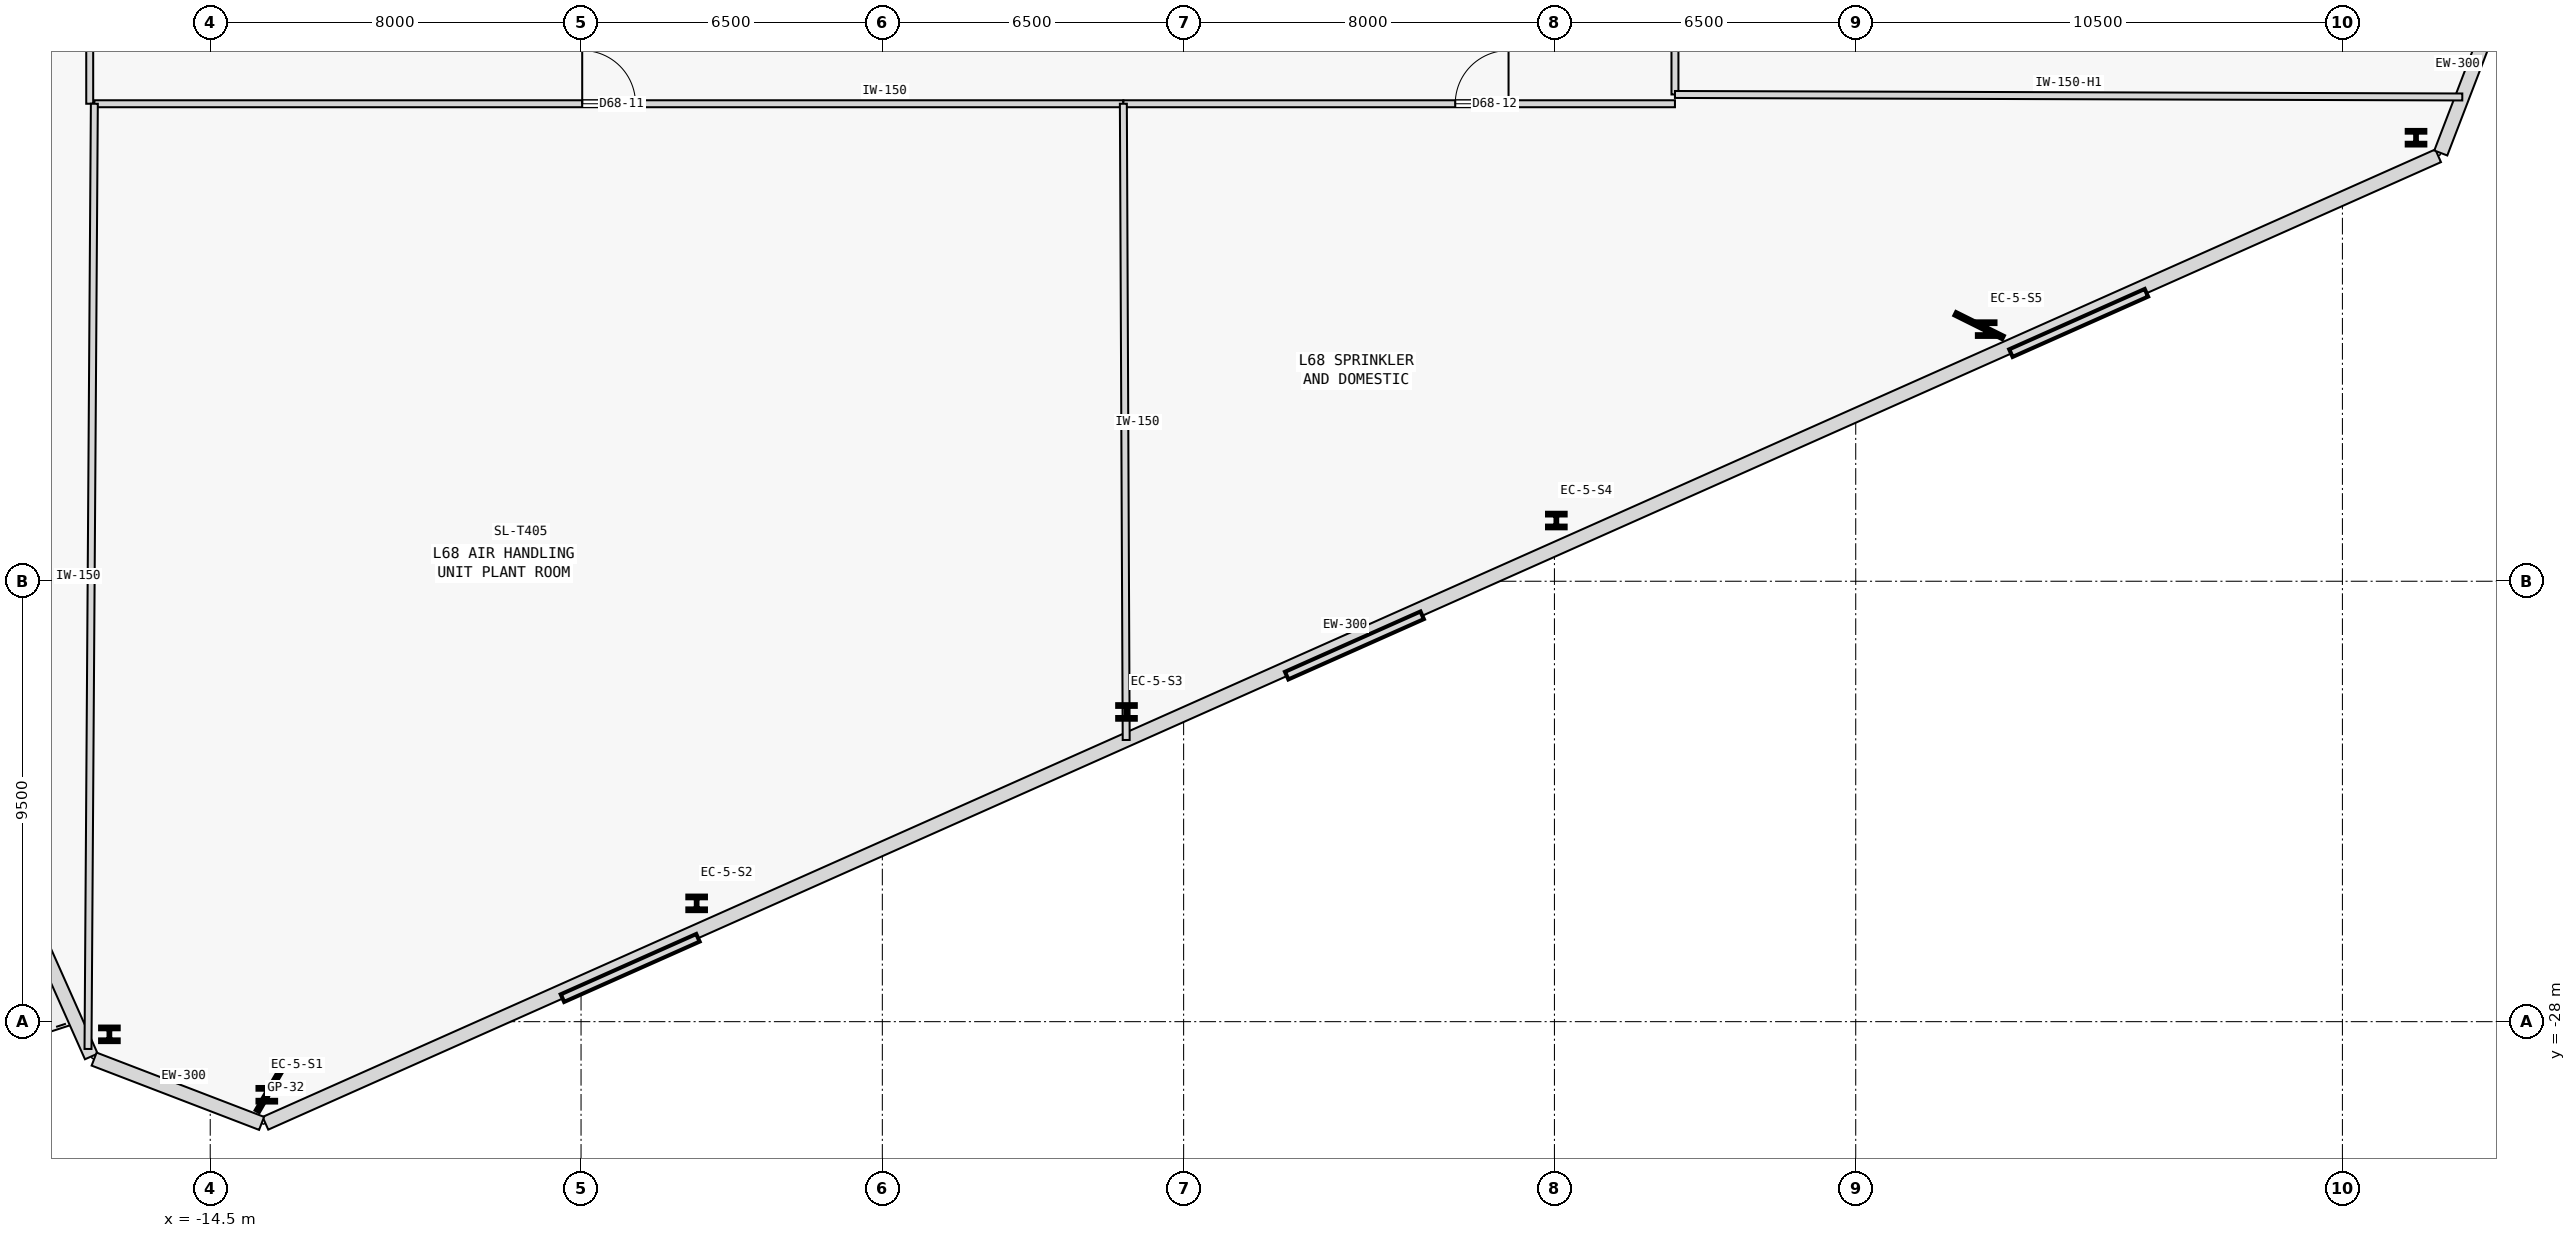
"""IFC4 building model, lengths in metres.
Left out: names, types, materials, properties, quantities, classifications, styles, units other than length and angle.
Written with IfcOpenShell. Run it as: python <this file> out.ifc"""

import sys

from ifc_helpers import new_model, si_unit, direction, frame, frame_2d, origin, origin_2d, place, context, subcontext, project, spatial, rectangle, i_section, extrude, element, fill, save


model = new_model("IFC4")
c1 = context("Model", 3, precision=1e-05, world=origin(), true_north=direction((0.0, 1.0)))
c2 = subcontext(c1, "Body", "Model", "MODEL_VIEW")
j1 = project(units=[si_unit("LENGTHUNIT", "METRE"), si_unit("PLANEANGLEUNIT", "RADIAN")], contexts=[c1])
p1 = place(None, origin())
s1 = spatial("IfcSite", under=j1, at=p1, CompositionType="ELEMENT")
p2 = place(p1, origin())
s2 = spatial("IfcBuilding", under=s1, at=p2, CompositionType="ELEMENT")
p3 = place(p2, frame((0.0, 0.0, 254.45)))
s3 = spatial("IfcBuildingStorey", under=s2, at=p3, CompositionType="ELEMENT", Elevation=254.45)
for number, where, z_axis, x_axis in (
    (1, (-13.28, -29.577, 0.0), (0.0, 0.0, 1.0), (1.0, 0.0, 0.0)),
    (2, (-4.006, -25.448, 0.0), (0.0, 0.0, 1.0), (1.0, 0.0, 0.0)),
    (3, (5.268, -21.319, 0.0), (0.0, 0.0, 1.0), (1.0, 0.0, 0.0)),
    (4, (14.541, -17.19, 0.0), (0.0, 0.0, 1.0), (1.0, 0.0, 0.0)),
    (5, (23.814, -13.062, 0.0), (0.0, 0.0, 1.0), (1.0, 0.0, 0.0)),
    (6, (33.088, -8.933, 0.0), (0.0, 0.0, 1.0), (1.0, 0.0, 0.0)),
    (7, (-16.676, -28.273, 0.0), (0.0, 0.0, 1.0), (1.0, 0.0, 0.0)),
):
    element("IfcColumn", number, at=place(p3, frame(where, z_axis=z_axis, x_axis=x_axis)), inside=s3, PredefinedType="COLUMN", context=c2, shape_type="SweptSolid", body=[
        extrude(i_section(OverallWidth=0.401, OverallDepth=0.335, WebThickness=0.036, FlangeThickness=0.058, FilletRadius=0.015, at=origin_2d()), origin(), (0.0, 0.0, 1.0), 4.4),
    ])
p4 = place(p3, frame((-13.309, -30.192, 0.0), z_axis=(0.0, 0.0, 1.0), x_axis=(0.913545681585, 0.406736140093, 0.0)))
e8 = element("IfcWall", 8, at=p4, inside=s3, PredefinedType="STANDARD", context=c2, shape_type="SweptSolid", body=[
    extrude(rectangle(XDim=51.31, YDim=0.3, at=frame_2d((25.655, 0.0))), origin(), (0.0, 0.0, 1.0), 4.175),
])
p5 = place(p3, frame((33.622, -9.262, 0.0), z_axis=(0.0, 0.0, 1.0), x_axis=(0.358344855618, 0.933589291098, 0.0)))
e9 = element("IfcWall", 9, at=p5, inside=s3, PredefinedType="STANDARD", context=c2, shape_type="SweptSolid", body=[
    extrude(rectangle(XDim=3.87, YDim=0.3, at=frame_2d((1.935, 0.0))), origin(), (0.0, 0.0, 1.0), 4.175),
])
p6 = place(p3, frame((-30.207, 0.766, 0.0), z_axis=(0.0, 0.0, 1.0), x_axis=(0.406735709426, -0.91354587333, 0.0)))
e10 = element("IfcWall", 10, at=p6, inside=s3, PredefinedType="STANDARD", context=c2, shape_type="SweptSolid", body=[
    extrude(rectangle(XDim=32.31, YDim=0.3, at=frame_2d((16.155, 0.0))), origin(), (0.0, 0.0, 1.0), 4.175),
])
p7 = place(p3, frame((-17.005, -28.808, 0.0), z_axis=(0.0, 0.0, 1.0), x_axis=(0.933589291098, -0.358344855618, 0.0)))
e11 = element("IfcWall", 11, at=p7, inside=s3, PredefinedType="STANDARD", context=c2, shape_type="SweptSolid", body=[
    extrude(rectangle(XDim=3.87, YDim=0.3, at=frame_2d((1.935, 0.0))), origin(), (0.0, 0.0, 1.0), 4.175),
])
p8 = place(p3, frame((-17.0, -8.2, 0.0), z_axis=(0.0, 0.0, 1.0), x_axis=(1.0, 0.0, 0.0)))
e12 = element("IfcWall", 12, at=p8, inside=s3, PredefinedType="PARTITIONING", context=c2, shape_type="SweptSolid", body=[
    extrude(rectangle(XDim=22.2, YDim=0.15, at=frame_2d((11.1, 0.0))), origin(), (0.0, 0.0, 1.0), 4.175),
])
p9 = place(p8, frame((10.525, 0.0, 0.0)))
e13 = element("IfcOpeningElement", 13, at=p9, cuts=e12, PredefinedType="OPENING", context=c2, shape_type="SweptSolid", body=[
    extrude(rectangle(XDim=1.15, YDim=2.15, at=frame_2d((0.575, 1.075))), frame((0.0, 0.085, 0.0), z_axis=(0.0, -1.0, 0.0), x_axis=(1.0, 0.0, 0.0)), (0.0, 0.0, 1.0), 0.17),
])
p10 = place(p3, frame((5.2, -8.2, 0.0), z_axis=(0.0, 0.0, 1.0), x_axis=(1.0, 0.0, 0.0)))
e14 = element("IfcWall", 14, at=p10, inside=s3, PredefinedType="PARTITIONING", context=c2, shape_type="SweptSolid", body=[
    extrude(rectangle(XDim=11.9, YDim=0.15, at=frame_2d((5.95, 0.0))), origin(), (0.0, 0.0, 1.0), 4.175),
])
p11 = place(p10, frame((7.16, 0.0, 0.0)))
e15 = element("IfcOpeningElement", 15, at=p11, cuts=e14, PredefinedType="OPENING", context=c2, shape_type="SweptSolid", body=[
    extrude(rectangle(XDim=1.15, YDim=2.15, at=frame_2d((0.575, 1.075))), frame((0.0, 0.085, 0.0), z_axis=(0.0, -1.0, 0.0), x_axis=(1.0, 0.0, 0.0)), (0.0, 0.0, 1.0), 0.17),
])
p12 = place(p3, frame((-17.1, -8.2, 0.0), z_axis=(0.0, 0.0, 1.0), x_axis=(0.0, 1.0, 0.0)))
e16 = element("IfcWall", 16, at=p12, inside=s3, PredefinedType="PARTITIONING", context=c2, shape_type="SweptSolid", body=[
    extrude(rectangle(XDim=16.4, YDim=0.15, at=frame_2d((8.2, 0.0))), origin(), (0.0, 0.0, 1.0), 4.175),
])
p13 = place(p12, frame((5.165, 0.0, 0.0)))
e17 = element("IfcOpeningElement", 17, at=p13, cuts=e16, PredefinedType="OPENING", context=c2, shape_type="SweptSolid", body=[
    extrude(rectangle(XDim=1.15, YDim=2.15, at=frame_2d((0.575, 1.075))), frame((0.0, 0.085, 0.0), z_axis=(0.0, -1.0, 0.0), x_axis=(1.0, 0.0, 0.0)), (0.0, 0.0, 1.0), 0.17),
])
p14 = place(p3, frame((17.1, -8.0, 0.0), z_axis=(0.0, 0.0, 1.0), x_axis=(0.0, 1.0, 0.0)))
e18 = element("IfcWall", 18, at=p14, inside=s3, PredefinedType="PARTITIONING", context=c2, shape_type="SweptSolid", body=[
    extrude(rectangle(XDim=16.0, YDim=0.15, at=frame_2d((8.0, 0.0))), origin(), (0.0, 0.0, 1.0), 4.175),
])
p15 = place(p14, frame((5.025, 0.0, 0.0)))
e19 = element("IfcOpeningElement", 19, at=p15, cuts=e18, PredefinedType="OPENING", context=c2, shape_type="SweptSolid", body=[
    extrude(rectangle(XDim=1.15, YDim=2.15, at=frame_2d((0.575, 1.075))), frame((0.0, 0.085, 0.0), z_axis=(0.0, -1.0, 0.0), x_axis=(1.0, 0.0, 0.0)), (0.0, 0.0, 1.0), 0.17),
])
p16 = place(p3, frame((5.261, -21.924, 0.0), z_axis=(0.0, 0.0, 1.0), x_axis=(-0.004447167621, 0.999990111301, 0.0)))
e20 = element("IfcWall", 20, at=p16, inside=s3, PredefinedType="PARTITIONING", context=c2, shape_type="SweptSolid", body=[
    extrude(rectangle(XDim=13.725, YDim=0.15, at=frame_2d((6.862, 0.0))), origin(), (0.0, 0.0, 1.0), 4.175),
])
p17 = place(p3, frame((-17.137, -28.589, 0.0), z_axis=(0.0, 0.0, 1.0), x_axis=(0.006717285044, 0.999977438786, 0.0)))
e21 = element("IfcWall", 21, at=p17, inside=s3, PredefinedType="PARTITIONING", context=c2, shape_type="SweptSolid", body=[
    extrude(rectangle(XDim=20.39, YDim=0.15, at=frame_2d((10.195, 0.0))), origin(), (0.0, 0.0, 1.0), 4.175),
])
p18 = place(p3, frame((17.1, -8.0, 0.0), z_axis=(0.0, 0.0, 1.0), x_axis=(0.999995000741, -0.003162039528, 0.0)))
e22 = element("IfcWall", 22, at=p18, inside=s3, PredefinedType="PARTITIONING", context=c2, shape_type="SweptSolid", body=[
    extrude(rectangle(XDim=16.986, YDim=0.15, at=frame_2d((8.493, 0.0))), origin(), (0.0, 0.0, 1.0), 3.725),
])
p19 = place(p9, origin())
e23 = element("IfcDoor", 23, at=p19, inside=s3, OperationType="SINGLE_SWING_LEFT", PredefinedType="DOOR", context=c2, shape_type="SweptSolid", body=[
    extrude(rectangle(XDim=1.15, YDim=2.15, at=frame_2d((0.575, 1.075))), frame((0.0, 0.025, 0.0), z_axis=(0.0, -1.0, 0.0), x_axis=(1.0, 0.0, 0.0)), (0.0, 0.0, 1.0), 0.05),
])
fill(e13, e23)
p20 = place(p11, origin())
e24 = element("IfcDoor", 24, at=p20, inside=s3, OperationType="SINGLE_SWING_RIGHT", PredefinedType="DOOR", context=c2, shape_type="SweptSolid", body=[
    extrude(rectangle(XDim=1.15, YDim=2.15, at=frame_2d((0.575, 1.075))), frame((0.0, 0.025, 0.0), z_axis=(0.0, -1.0, 0.0), x_axis=(1.0, 0.0, 0.0)), (0.0, 0.0, 1.0), 0.05),
])
fill(e15, e24)
save(model, sys.argv[1])
